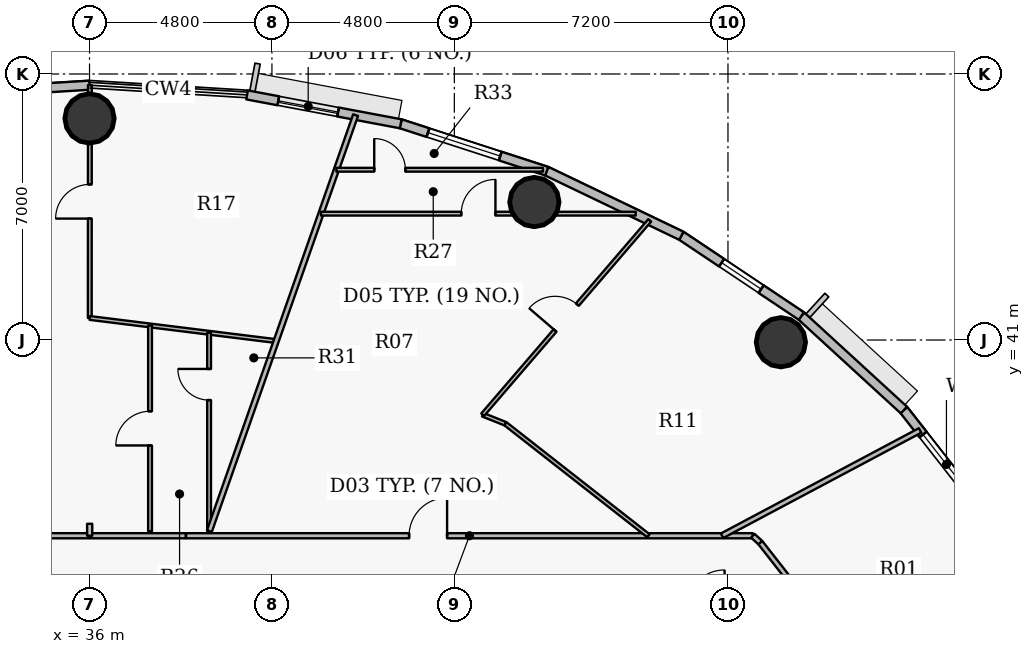
"""IFC4 building model, lengths in metres.
Left out: names, types, materials, properties, quantities, classifications, styles, units other than length and angle.
Written with IfcOpenShell. Run it as: python <this file> out.ifc"""

import sys

from ifc_helpers import new_model, si_unit, direction, frame, frame_2d, origin, origin_2d, place, context, subcontext, project, spatial, rectangle, hollow_circle, extrude, source, transform, mapped, element, fill, save


model = new_model("IFC4")
c1 = context("Model", 3, precision=1e-05, world=origin(), true_north=direction((0.0, 1.0)))
c2 = subcontext(c1, "Body", "Model", "MODEL_VIEW")
j1 = project(units=[si_unit("LENGTHUNIT", "METRE"), si_unit("PLANEANGLEUNIT", "RADIAN")], contexts=[c1])
p1 = place(None, origin())
s1 = spatial("IfcSite", under=j1, at=p1, CompositionType="ELEMENT")
p2 = place(p1, origin())
s2 = spatial("IfcBuilding", under=s1, at=p2, CompositionType="ELEMENT")
p3 = place(p2, frame((0.0, 0.0, 182.4)))
s3 = spatial("IfcBuildingStorey", under=s2, at=p3, CompositionType="ELEMENT", Elevation=182.4)
for number, where, z_axis, x_axis in (
    (1, (54.192, 40.942, 0.0), (0.0, 0.0, 1.0), (1.0, 0.0, 0.0)),
    (2, (47.706, 44.631, 0.0), (0.0, 0.0, 1.0), (1.0, 0.0, 0.0)),
    (3, (36.0, 46.83, 0.0), (0.0, 0.0, 1.0), (1.0, 0.0, 0.0)),
):
    element("IfcColumn", number, at=place(p3, frame(where, z_axis=z_axis, x_axis=x_axis)), inside=s3, PredefinedType="COLUMN", context=c2, shape_type="SweptSolid", body=[
        extrude(hollow_circle(Radius=0.65, WallThickness=0.04, at=origin_2d()), origin(), (0.0, 0.0, 1.0), 3.75),
    ])
p4 = place(p3, frame((57.428, 39.158, 0.0), z_axis=(0.0, 0.0, 1.0), x_axis=(0.616287674549, -0.787521112224, 0.0)))
e4 = element("IfcWall", 4, at=p4, inside=s3, PredefinedType="SOLIDWALL", context=c2, shape_type="SweptSolid", body=[
    extrude(rectangle(XDim=3.517, YDim=0.24, at=frame_2d((1.759, 0.0))), origin(), (0.0, 0.0, 1.0), 3.5),
])
p5 = place(p4, frame((0.819, 0.0, 0.9)))
e5 = element("IfcOpeningElement", 5, at=p5, cuts=e4, PredefinedType="OPENING", context=c2, shape_type="SweptSolid", body=[
    extrude(rectangle(XDim=2.0, YDim=1.75, at=origin_2d()), frame((1.0, 0.13, 0.875), z_axis=(0.0, -1.0, 0.0), x_axis=(1.0, 0.0, 0.0)), (0.0, 0.0, 1.0), 0.26),
])
p6 = place(p3, frame((54.732, 41.631, 0.0), z_axis=(0.0, 0.0, 1.0), x_axis=(0.737076565834, -0.675809245349, 0.0)))
e6 = element("IfcWall", 6, at=p6, inside=s3, PredefinedType="SOLIDWALL", context=c2, shape_type="SweptSolid", body=[
    extrude(rectangle(XDim=3.658, YDim=0.24, at=frame_2d((1.829, 0.0))), origin(), (0.0, 0.0, 1.0), 3.5),
])
p7 = place(p3, frame((51.573, 43.743, 0.0), z_axis=(0.0, 0.0, 1.0), x_axis=(0.831228998277, -0.555930168657, 0.0)))
e7 = element("IfcWall", 7, at=p7, inside=s3, PredefinedType="SOLIDWALL", context=c2, shape_type="SweptSolid", body=[
    extrude(rectangle(XDim=3.8, YDim=0.24, at=frame_2d((1.9, 0.0))), origin(), (0.0, 0.0, 1.0), 3.5),
])
p8 = place(p7, frame((1.275, 0.0, 0.9)))
e8 = element("IfcOpeningElement", 8, at=p8, cuts=e7, PredefinedType="OPENING", context=c2, shape_type="SweptSolid", body=[
    extrude(rectangle(XDim=1.25, YDim=1.65, at=origin_2d()), frame((0.625, 0.13, 0.825), z_axis=(0.0, -1.0, 0.0), x_axis=(1.0, 0.0, 0.0)), (0.0, 0.0, 1.0), 0.26),
])
p9 = place(p3, frame((48.03, 45.444, 0.0), z_axis=(0.0, 0.0, 1.0), x_axis=(0.901564733809, -0.432644231155, 0.0)))
e9 = element("IfcWall", 9, at=p9, inside=s3, PredefinedType="SOLIDWALL", context=c2, shape_type="SweptSolid", body=[
    extrude(rectangle(XDim=3.93, YDim=0.24, at=frame_2d((1.965, 0.0))), origin(), (0.0, 0.0, 1.0), 3.5),
])
p10 = place(p3, frame((44.189, 46.689, 0.0), z_axis=(0.0, 0.0, 1.0), x_axis=(0.951209870236, -0.30854462038, 0.0)))
e10 = element("IfcWall", 10, at=p10, inside=s3, PredefinedType="SOLIDWALL", context=c2, shape_type="SweptSolid", body=[
    extrude(rectangle(XDim=4.038, YDim=0.24, at=frame_2d((2.019, 0.0))), origin(), (0.0, 0.0, 1.0), 3.5),
])
p11 = place(p10, frame((0.753, 0.0, 0.9)))
e11 = element("IfcOpeningElement", 11, at=p11, cuts=e10, PredefinedType="OPENING", context=c2, shape_type="SweptSolid", body=[
    extrude(rectangle(XDim=2.0, YDim=1.75, at=origin_2d()), frame((1.0, 0.13, 0.875), z_axis=(0.0, -1.0, 0.0), x_axis=(1.0, 0.0, 0.0)), (0.0, 0.0, 1.0), 0.26),
])
p12 = place(p3, frame((40.146, 47.449, 0.0), z_axis=(0.0, 0.0, 1.0), x_axis=(0.982788108205, -0.184736391573, 0.0)))
e12 = element("IfcWall", 12, at=p12, inside=s3, PredefinedType="SOLIDWALL", context=c2, shape_type="SweptSolid", body=[
    extrude(rectangle(XDim=4.114, YDim=0.24, at=frame_2d((2.057, 0.0))), origin(), (0.0, 0.0, 1.0), 3.5),
])
p13 = place(p12, frame((0.836, 0.0, 0.9)))
e13 = element("IfcOpeningElement", 13, at=p13, cuts=e12, PredefinedType="OPENING", context=c2, shape_type="SweptSolid", body=[
    extrude(rectangle(XDim=1.6, YDim=1.75, at=origin_2d()), frame((0.8, 0.13, 0.875), z_axis=(0.0, -1.0, 0.0), x_axis=(1.0, 0.0, 0.0)), (0.0, 0.0, 1.0), 0.26),
])
p14 = place(p3, frame((31.854, 47.449, 0.0), z_axis=(0.0, 0.0, 1.0), x_axis=(0.998104600619, 0.061540281305, 0.0)))
e14 = element("IfcWall", 14, at=p14, inside=s3, PredefinedType="SOLIDWALL", context=c2, shape_type="SweptSolid", body=[
    extrude(rectangle(XDim=4.154, YDim=0.24, at=frame_2d((2.077, 0.0))), origin(), (0.0, 0.0, 1.0), 3.5),
])
p15 = place(p14, frame((1.082, 0.0, 0.9)))
e15 = element("IfcOpeningElement", 15, at=p15, cuts=e14, PredefinedType="OPENING", context=c2, shape_type="SweptSolid", body=[
    extrude(rectangle(XDim=2.0, YDim=1.75, at=origin_2d()), frame((1.0, 0.13, 0.875), z_axis=(0.0, -1.0, 0.0), x_axis=(1.0, 0.0, 0.0)), (0.0, 0.0, 1.0), 0.26),
])
p16 = place(p3, frame((24.35, 35.85, 0.0), z_axis=(0.0, 0.0, 1.0), x_axis=(1.0, 0.0, 0.0)))
e16 = element("IfcWall", 16, at=p16, inside=s3, PredefinedType="PARTITIONING", context=c2, shape_type="SweptSolid", body=[
    extrude(rectangle(XDim=11.654, YDim=0.135, at=frame_2d((5.827, 0.0))), origin(), (0.0, 0.0, 1.0), 2.935),
])
p17 = place(p16, frame((7.592, 0.0, 0.0)))
e17 = element("IfcOpeningElement", 17, at=p17, cuts=e16, PredefinedType="OPENING", context=c2, shape_type="SweptSolid", body=[
    extrude(rectangle(XDim=1.0, YDim=2.15, at=origin_2d()), frame((0.5, 0.078, 1.075), z_axis=(0.0, -1.0, 0.0), x_axis=(1.0, 0.0, 0.0)), (0.0, 0.0, 1.0), 0.155),
])
p18 = place(p3, frame((36.007, 41.58, 0.0), z_axis=(0.0, 0.0, 1.0), x_axis=(0.000477973338, 0.999999885771, 0.0)))
e18 = element("IfcWall", 18, at=p18, inside=s3, PredefinedType="PARTITIONING", context=c2, shape_type="SweptSolid", body=[
    extrude(rectangle(XDim=6.129, YDim=0.1, at=frame_2d((3.065, 0.0))), origin(), (0.0, 0.0, 1.0), 2.935),
])
p19 = place(p18, frame((2.615, 0.0, 0.0)))
e19 = element("IfcOpeningElement", 19, at=p19, cuts=e18, PredefinedType="OPENING", context=c2, shape_type="SweptSolid", body=[
    extrude(rectangle(XDim=0.9, YDim=2.1, at=origin_2d()), frame((0.45, 0.06, 1.05), z_axis=(0.0, -1.0, 0.0), x_axis=(1.0, 0.0, 0.0)), (0.0, 0.0, 1.0), 0.12),
])
p20 = place(p3, frame((36.007, 41.58, 0.0), z_axis=(0.0, 0.0, 1.0), x_axis=(0.992395965764, -0.123086340169, 0.0)))
e20 = element("IfcWall", 20, at=p20, inside=s3, PredefinedType="PARTITIONING", context=c2, shape_type="SweptSolid", body=[
    extrude(rectangle(XDim=4.943, YDim=0.1, at=frame_2d((2.471, 0.0))), origin(), (0.0, 0.0, 1.0), 2.935),
])
p21 = place(p3, frame((37.592, 35.968, 0.0), z_axis=(0.0, 0.0, 1.0), x_axis=(0.0, 1.0, 0.0)))
e21 = element("IfcWall", 21, at=p21, inside=s3, PredefinedType="PARTITIONING", context=c2, shape_type="SweptSolid", body=[
    extrude(rectangle(XDim=5.416, YDim=0.1, at=frame_2d((2.708, 0.0))), origin(), (0.0, 0.0, 1.0), 3.185),
])
p22 = place(p21, frame((2.258, 0.0, 0.0)))
e22 = element("IfcOpeningElement", 22, at=p22, cuts=e21, PredefinedType="OPENING", context=c2, shape_type="SweptSolid", body=[
    extrude(rectangle(XDim=0.9, YDim=2.1, at=origin_2d()), frame((0.45, 0.06, 1.05), z_axis=(0.0, -1.0, 0.0), x_axis=(1.0, 0.0, 0.0)), (0.0, 0.0, 1.0), 0.12),
])
p23 = place(p3, frame((38.541, 35.85, 0.0), z_axis=(0.0, 0.0, 1.0), x_axis=(1.0, 0.0, 0.0)))
e23 = element("IfcWall", 23, at=p23, inside=s3, PredefinedType="PARTITIONING", context=c2, shape_type="SweptSolid", body=[
    extrude(rectangle(XDim=14.913, YDim=0.135, at=frame_2d((7.456, 0.0))), origin(), (0.0, 0.0, 1.0), 2.935),
])
p24 = place(p23, frame((5.868, 0.0, 0.0)))
e24 = element("IfcOpeningElement", 24, at=p24, cuts=e23, PredefinedType="OPENING", context=c2, shape_type="SweptSolid", body=[
    extrude(rectangle(XDim=1.0, YDim=2.15, at=origin_2d()), frame((0.5, 0.078, 1.075), z_axis=(0.0, -1.0, 0.0), x_axis=(1.0, 0.0, 0.0)), (0.0, 0.0, 1.0), 0.155),
])
p25 = place(p3, frame((39.146, 35.973, 0.0), z_axis=(0.0, 0.0, 1.0), x_axis=(0.0, 1.0, 0.0)))
e25 = element("IfcWall", 25, at=p25, inside=s3, PredefinedType="PARTITIONING", context=c2, shape_type="SweptSolid", body=[
    extrude(rectangle(XDim=5.218, YDim=0.1, at=frame_2d((2.609, 0.0))), origin(), (0.0, 0.0, 1.0), 3.5),
])
p26 = place(p25, frame((3.446, 0.0, 0.0)))
e26 = element("IfcOpeningElement", 26, at=p26, cuts=e25, PredefinedType="OPENING", context=c2, shape_type="SweptSolid", body=[
    extrude(rectangle(XDim=0.82, YDim=2.1, at=origin_2d()), frame((0.41, 0.06, 1.05), z_axis=(0.0, -1.0, 0.0), x_axis=(1.0, 0.0, 0.0)), (0.0, 0.0, 1.0), 0.12),
])
p27 = place(p3, frame((39.154, 35.972, 0.0), z_axis=(0.0, 0.0, 1.0), x_axis=(0.331639887377, 0.94340605526, 0.0)))
e27 = element("IfcWall", 27, at=p27, inside=s3, PredefinedType="PARTITIONING", context=c2, shape_type="SweptSolid", body=[
    extrude(rectangle(XDim=11.602, YDim=0.135, at=frame_2d((5.801, 0.0))), origin(), (0.0, 0.0, 1.0), 2.935),
])
p28 = place(p3, frame((42.09, 44.325, 0.0), z_axis=(0.0, 0.0, 1.0), x_axis=(1.0, 0.0, 0.0)))
e28 = element("IfcWall", 28, at=p28, inside=s3, PredefinedType="PARTITIONING", context=c2, shape_type="SweptSolid", body=[
    extrude(rectangle(XDim=8.282, YDim=0.1, at=frame_2d((4.141, 0.0))), origin(), (0.0, 0.0, 1.0), 2.935),
])
p29 = place(p28, frame((3.691, 0.0, 0.0)))
e29 = element("IfcOpeningElement", 29, at=p29, cuts=e28, PredefinedType="OPENING", context=c2, shape_type="SweptSolid", body=[
    extrude(rectangle(XDim=0.9, YDim=2.1, at=origin_2d()), frame((0.45, 0.06, 1.05), z_axis=(0.0, -1.0, 0.0), x_axis=(1.0, 0.0, 0.0)), (0.0, 0.0, 1.0), 0.12),
])
p30 = place(p3, frame((42.497, 45.48, 0.0), z_axis=(0.0, 0.0, 1.0), x_axis=(1.0, 0.0, 0.0)))
e30 = element("IfcWall", 30, at=p30, inside=s3, PredefinedType="PARTITIONING", context=c2, shape_type="SweptSolid", body=[
    extrude(rectangle(XDim=5.435, YDim=0.1, at=frame_2d((2.718, 0.0))), origin(), (0.0, 0.0, 1.0), 2.935),
])
p31 = place(p30, frame((0.995, 0.0, 0.0)))
e31 = element("IfcOpeningElement", 31, at=p31, cuts=e30, PredefinedType="OPENING", context=c2, shape_type="SweptSolid", body=[
    extrude(rectangle(XDim=0.82, YDim=2.1, at=origin_2d()), frame((0.41, 0.06, 1.05), z_axis=(0.0, -1.0, 0.0), x_axis=(1.0, 0.0, 0.0)), (0.0, 0.0, 1.0), 0.12),
])
p32 = place(p3, frame((46.346, 39.035, 0.0), z_axis=(0.0, 0.0, 1.0), x_axis=(0.928841988182, -0.370476127423, 0.0)))
e32 = element("IfcWall", 32, at=p32, inside=s3, PredefinedType="PARTITIONING", context=c2, shape_type="SweptSolid", body=[
    extrude(rectangle(XDim=0.645, YDim=0.1, at=frame_2d((0.322, 0.0))), origin(), (0.0, 0.0, 1.0), 3.5),
])
p33 = place(p3, frame((46.346, 39.035, 0.0), z_axis=(0.0, 0.0, 1.0), x_axis=(0.651891052095, 0.758312637504, 0.0)))
e33 = element("IfcWall", 33, at=p33, inside=s3, PredefinedType="PARTITIONING", context=c2, shape_type="SweptSolid", body=[
    extrude(rectangle(XDim=6.742, YDim=0.1, at=frame_2d((3.371, 0.0))), origin(), (0.0, 0.0, 1.0), 2.935),
])
p34 = place(p33, frame((2.921, 0.0, 0.0)))
e34 = element("IfcOpeningElement", 34, at=p34, cuts=e33, PredefinedType="OPENING", context=c2, shape_type="SweptSolid", body=[
    extrude(rectangle(XDim=0.9, YDim=2.1, at=origin_2d()), frame((0.45, 0.06, 1.05), z_axis=(0.0, -1.0, 0.0), x_axis=(1.0, 0.0, 0.0)), (0.0, 0.0, 1.0), 0.12),
])
p35 = place(p3, frame((46.945, 38.796, 0.0), z_axis=(0.0, 0.0, 1.0), x_axis=(0.787326008068, -0.616536906454, 0.0)))
e35 = element("IfcWall", 35, at=p35, inside=s3, PredefinedType="PARTITIONING", context=c2, shape_type="SweptSolid", body=[
    extrude(rectangle(XDim=4.779, YDim=0.1, at=frame_2d((2.389, 0.0))), origin(), (0.0, 0.0, 1.0), 2.935),
])
p36 = place(p3, frame((52.645, 35.85, 0.0), z_axis=(0.0, 0.0, 1.0), x_axis=(0.882944268091, 0.469477815712, 0.0)))
e36 = element("IfcWall", 36, at=p36, inside=s3, PredefinedType="PARTITIONING", context=c2, shape_type="SweptSolid", body=[
    extrude(rectangle(XDim=5.902, YDim=0.135, at=frame_2d((2.951, 0.0))), origin(), (0.0, 0.0, 1.0), 2.935),
])
p37 = place(p3, frame((53.454, 35.85, 0.0), z_axis=(0.0, 0.0, 1.0), x_axis=(0.736667385572, -0.676255249913, 0.0)))
e37 = element("IfcWall", 37, at=p37, inside=s3, PredefinedType="PARTITIONING", context=c2, shape_type="SweptSolid", body=[
    extrude(rectangle(XDim=0.271, YDim=0.135, at=frame_2d((0.135, 0.0))), origin(), (0.0, 0.0, 1.0), 3.5),
])
p38 = place(p3, frame((53.653, 35.667, 0.0), z_axis=(0.0, 0.0, 1.0), x_axis=(0.616302223209, -0.787509726713, 0.0)))
e38 = element("IfcWall", 38, at=p38, inside=s3, PredefinedType="PARTITIONING", context=c2, shape_type="SweptSolid", body=[
    extrude(rectangle(XDim=2.18, YDim=0.135, at=frame_2d((1.09, 0.0))), origin(), (0.0, 0.0, 1.0), 3.5),
])
p39 = place(p3, frame((36.014, 35.85, 0.0), z_axis=(0.0, 0.0, 1.0), x_axis=(1.0, 0.0, 0.0)))
e39 = element("IfcWall", 39, at=p39, inside=s3, PredefinedType="PARTITIONING", context=c2, shape_type="SweptSolid", body=[
    extrude(rectangle(XDim=2.517, YDim=0.135, at=frame_2d((1.259, 0.0))), origin(), (0.0, 0.0, 1.0), 2.935),
])
p40 = place(p3, frame((36.004, 36.165, 0.0), z_axis=(0.0, 0.0, 1.0), x_axis=(0.0, -1.0, 0.0)))
e40 = element("IfcWall", 40, at=p40, inside=s3, PredefinedType="PARTITIONING", context=c2, shape_type="SweptSolid", body=[
    extrude(rectangle(XDim=0.315, YDim=0.135, at=frame_2d((0.157, 0.0))), origin(), (0.0, 0.0, 1.0), 2.935),
])
m1 = source(origin(), c2, "Body", "SweptSolid", [
    extrude(rectangle(XDim=2.0, YDim=1.75, at=origin_2d()), frame((1.0, 0.03, 0.875), z_axis=(0.0, -1.0, 0.0), x_axis=(1.0, 0.0, 0.0)), (0.0, 0.0, 1.0), 0.06),
])
p41 = place(p5, origin())
e41 = element("IfcWindow", 41, at=p41, inside=s3, PartitioningType="DOUBLE_PANEL_VERTICAL", PredefinedType="WINDOW", context=c2, shape_type="MappedRepresentation", body=[
    mapped(m1, transform((0.0, 0.0, 0.0), x_axis=(1.0, 0.0, 0.0), y_axis=(0.0, 1.0, 0.0), z_axis=(0.0, 0.0, 1.0), scale=1.0)),
])
fill(e5, e41)
p42 = place(p11, origin())
e42 = element("IfcWindow", 42, at=p42, inside=s3, PartitioningType="DOUBLE_PANEL_VERTICAL", PredefinedType="WINDOW", context=c2, shape_type="MappedRepresentation", body=[
    mapped(m1, transform((0.0, 0.0, 0.0), x_axis=(1.0, 0.0, 0.0), y_axis=(0.0, 1.0, 0.0), z_axis=(0.0, 0.0, 1.0), scale=1.0)),
])
fill(e11, e42)
m2 = source(origin(), c2, "Body", "SweptSolid", [
    extrude(rectangle(XDim=1.6, YDim=1.75, at=origin_2d()), frame((0.8, 0.03, 0.875), z_axis=(0.0, -1.0, 0.0), x_axis=(1.0, 0.0, 0.0)), (0.0, 0.0, 1.0), 0.06),
])
p43 = place(p13, origin())
e43 = element("IfcWindow", 43, at=p43, inside=s3, PartitioningType="DOUBLE_PANEL_VERTICAL", PredefinedType="WINDOW", context=c2, shape_type="MappedRepresentation", body=[
    mapped(m2, transform((0.0, 0.0, 0.0), x_axis=(1.0, 0.0, 0.0), y_axis=(0.0, 1.0, 0.0), z_axis=(0.0, 0.0, 1.0), scale=1.0)),
])
fill(e13, e43)
m3 = source(origin(), c2, "Body", "SweptSolid", [
    extrude(rectangle(XDim=1.25, YDim=1.65, at=origin_2d()), frame((0.625, 0.03, 0.825), z_axis=(0.0, -1.0, 0.0), x_axis=(1.0, 0.0, 0.0)), (0.0, 0.0, 1.0), 0.06),
])
p44 = place(p8, origin())
e44 = element("IfcWindow", 44, at=p44, inside=s3, PartitioningType="SINGLE_PANEL", PredefinedType="WINDOW", context=c2, shape_type="MappedRepresentation", body=[
    mapped(m3, transform((0.0, 0.0, 0.0), x_axis=(1.0, 0.0, 0.0), y_axis=(0.0, 1.0, 0.0), z_axis=(0.0, 0.0, 1.0), scale=1.0)),
])
fill(e8, e44)
m4 = source(origin(), c2, "Body", "SweptSolid", [
    extrude(rectangle(XDim=1.0, YDim=2.15, at=origin_2d()), frame((0.5, 0.025, 1.075), z_axis=(0.0, -1.0, 0.0), x_axis=(1.0, 0.0, 0.0)), (0.0, 0.0, 1.0), 0.05),
])
p45 = place(p24, origin())
e45 = element("IfcDoor", 45, at=p45, inside=s3, OperationType="SINGLE_SWING_RIGHT", PredefinedType="DOOR", context=c2, shape_type="MappedRepresentation", body=[
    mapped(m4, transform((0.0, 0.0, 0.0), x_axis=(1.0, 0.0, 0.0), y_axis=(0.0, 1.0, 0.0), z_axis=(0.0, 0.0, 1.0), scale=1.0)),
])
fill(e24, e45)
m5 = source(origin(), c2, "Body", "SweptSolid", [
    extrude(rectangle(XDim=0.9, YDim=2.1, at=origin_2d()), frame((0.45, 0.025, 1.05), z_axis=(0.0, -1.0, 0.0), x_axis=(1.0, 0.0, 0.0)), (0.0, 0.0, 1.0), 0.05),
])
p46 = place(p34, origin())
e46 = element("IfcDoor", 46, at=p46, inside=s3, OperationType="SINGLE_SWING_LEFT", PredefinedType="DOOR", context=c2, shape_type="MappedRepresentation", body=[
    mapped(m5, transform((0.0, 0.0, 0.0), x_axis=(1.0, 0.0, 0.0), y_axis=(0.0, 1.0, 0.0), z_axis=(0.0, 0.0, 1.0), scale=1.0)),
])
fill(e34, e46)
p47 = place(p29, origin())
e47 = element("IfcDoor", 47, at=p47, inside=s3, OperationType="SINGLE_SWING_RIGHT", PredefinedType="DOOR", context=c2, shape_type="MappedRepresentation", body=[
    mapped(m5, transform((0.0, 0.0, 0.0), x_axis=(1.0, 0.0, 0.0), y_axis=(0.0, 1.0, 0.0), z_axis=(0.0, 0.0, 1.0), scale=1.0)),
])
fill(e29, e47)
m6 = source(origin(), c2, "Body", "SweptSolid", [
    extrude(rectangle(XDim=0.82, YDim=2.1, at=origin_2d()), frame((0.41, 0.025, 1.05), z_axis=(0.0, -1.0, 0.0), x_axis=(1.0, 0.0, 0.0)), (0.0, 0.0, 1.0), 0.05),
])
p48 = place(p31, origin())
e48 = element("IfcDoor", 48, at=p48, inside=s3, OperationType="SINGLE_SWING_LEFT", PredefinedType="DOOR", context=c2, shape_type="MappedRepresentation", body=[
    mapped(m6, transform((0.0, 0.0, 0.0), x_axis=(1.0, 0.0, 0.0), y_axis=(0.0, 1.0, 0.0), z_axis=(0.0, 0.0, 1.0), scale=1.0)),
])
fill(e31, e48)
p49 = place(p19, origin())
e49 = element("IfcDoor", 49, at=p49, inside=s3, OperationType="SINGLE_SWING_LEFT", PredefinedType="DOOR", context=c2, shape_type="MappedRepresentation", body=[
    mapped(m5, transform((0.0, 0.0, 0.0), x_axis=(1.0, 0.0, 0.0), y_axis=(0.0, 1.0, 0.0), z_axis=(0.0, 0.0, 1.0), scale=1.0)),
])
fill(e19, e49)
p50 = place(p22, origin())
e50 = element("IfcDoor", 50, at=p50, inside=s3, OperationType="SINGLE_SWING_LEFT", PredefinedType="DOOR", context=c2, shape_type="MappedRepresentation", body=[
    mapped(m5, transform((0.0, 0.0, 0.0), x_axis=(1.0, 0.0, 0.0), y_axis=(0.0, 1.0, 0.0), z_axis=(0.0, 0.0, 1.0), scale=1.0)),
])
fill(e22, e50)
p51 = place(p26, origin())
e51 = element("IfcDoor", 51, at=p51, inside=s3, OperationType="SINGLE_SWING_RIGHT", PredefinedType="DOOR", context=c2, shape_type="MappedRepresentation", body=[
    mapped(m6, transform((0.0, 0.0, 0.0), x_axis=(1.0, 0.0, 0.0), y_axis=(0.0, 1.0, 0.0), z_axis=(0.0, 0.0, 1.0), scale=1.0)),
])
fill(e26, e51)
save(model, sys.argv[1])
